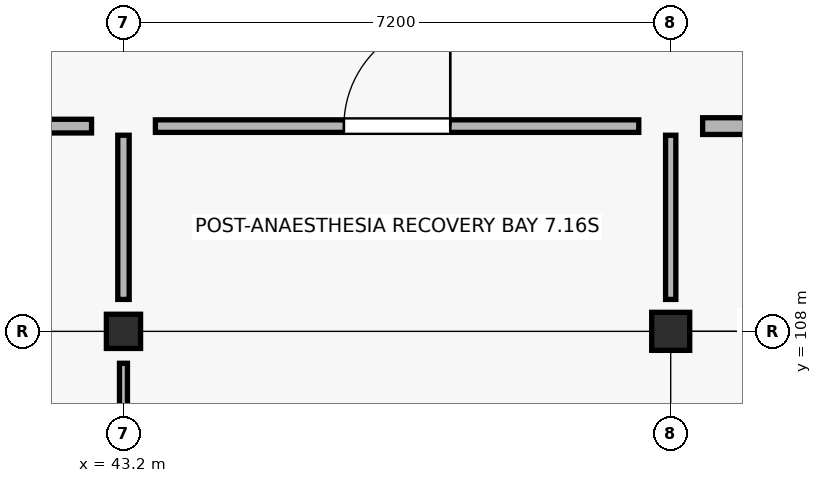
"""IFC4 building model, lengths in metres.
Left out: names, types, materials, properties, quantities, classifications, styles, units other than length and angle.
Written with IfcOpenShell. Run it as: python <this file> out.ifc"""

import sys

from ifc_helpers import new_model, si_unit, direction, frame, frame_2d, origin, origin_2d, place, context, subcontext, project, spatial, rectangle, extrude, element, fill, save


model = new_model("IFC4")
c1 = context("Model", 3, precision=1e-05, world=origin(), true_north=direction((0.0, 1.0)))
c2 = subcontext(c1, "Body", "Model", "MODEL_VIEW")
j1 = project(units=[si_unit("LENGTHUNIT", "METRE"), si_unit("PLANEANGLEUNIT", "RADIAN")], contexts=[c1])
p1 = place(None, origin())
s1 = spatial("IfcSite", under=j1, at=p1, CompositionType="ELEMENT")
p2 = place(p1, origin())
s2 = spatial("IfcBuilding", under=s1, at=p2, CompositionType="ELEMENT")
p3 = place(p2, frame((0.0, 0.0, 9.0)))
s3 = spatial("IfcBuildingStorey", under=s2, at=p3, CompositionType="ELEMENT", Elevation=9.0)
p4 = place(p3, frame((43.2, 108.0, 0.0), z_axis=(0.0, 0.0, 1.0), x_axis=(1.0, 0.0, 0.0)))
e1 = element("IfcColumn", 1, at=p4, inside=s3, PredefinedType="COLUMN", context=c2, shape_type="SweptSolid", body=[
    extrude(rectangle(XDim=0.45, YDim=0.45, at=origin_2d()), origin(), (0.0, 0.0, 1.0), 4.28),
])
p5 = place(p3, frame((50.4, 108.0, 0.0), z_axis=(0.0, 0.0, 1.0), x_axis=(1.0, 0.0, 0.0)))
e2 = element("IfcColumn", 2, at=p5, inside=s3, PredefinedType="COLUMN", context=c2, shape_type="SweptSolid", body=[
    extrude(rectangle(XDim=0.5, YDim=0.5, at=origin_2d()), origin(), (0.0, 0.0, 1.0), 4.28),
])
p6 = place(p3, frame((43.2, 105.54, 0.0), z_axis=(0.0, 0.0, 1.0), x_axis=(0.0, 1.0, 0.0)))
e3 = element("IfcWall", 3, at=p6, inside=s3, PredefinedType="PARTITIONING", context=c2, shape_type="SweptSolid", body=[
    extrude(rectangle(XDim=2.04, YDim=0.105, at=frame_2d((1.02, 0.0))), origin(), (0.0, 0.0, 1.0), 3.38),
])
p7 = place(p3, frame((36.42, 110.7, 0.0), z_axis=(0.0, 0.0, 1.0), x_axis=(1.0, 0.0, 0.0)))
e4 = element("IfcWall", 4, at=p7, inside=s3, PredefinedType="PARTITIONING", context=c2, shape_type="SweptSolid", body=[
    extrude(rectangle(XDim=6.36, YDim=0.18, at=frame_2d((3.18, 0.0))), origin(), (0.0, 0.0, 1.0), 3.38),
])
p8 = place(p7, frame((2.71, 0.0, 0.0)))
e5 = element("IfcOpeningElement", 5, at=p8, cuts=e4, PredefinedType="OPENING", context=c2, shape_type="SweptSolid", body=[
    extrude(rectangle(XDim=0.94, YDim=2.19, at=frame_2d((0.47, 1.095))), frame((0.0, 0.1, 0.0), z_axis=(0.0, -1.0, 0.0), x_axis=(1.0, 0.0, 0.0)), (0.0, 0.0, 1.0), 0.2),
])
p9 = place(p3, frame((43.2, 108.42, 0.0), z_axis=(0.0, 0.0, 1.0), x_axis=(0.0, 1.0, 0.0)))
e6 = element("IfcWall", 6, at=p9, inside=s3, PredefinedType="PARTITIONING", context=c2, shape_type="SweptSolid", body=[
    extrude(rectangle(XDim=2.16, YDim=0.15, at=frame_2d((1.08, 0.0))), origin(), (0.0, 0.0, 1.0), 3.38),
])
p10 = place(p3, frame((43.62, 110.7, 0.0), z_axis=(0.0, 0.0, 1.0), x_axis=(1.0, 0.0, 0.0)))
e7 = element("IfcWall", 7, at=p10, inside=s3, PredefinedType="PARTITIONING", context=c2, shape_type="SweptSolid", body=[
    extrude(rectangle(XDim=6.36, YDim=0.165, at=frame_2d((3.18, 0.0))), origin(), (0.0, 0.0, 1.0), 3.38),
])
p11 = place(p10, frame((2.48, 0.0, 0.0)))
e8 = element("IfcOpeningElement", 8, at=p11, cuts=e7, PredefinedType="OPENING", context=c2, shape_type="SweptSolid", body=[
    extrude(rectangle(XDim=1.4, YDim=2.2, at=frame_2d((0.7, 1.1))), frame((0.0, 0.093, 0.0), z_axis=(0.0, -1.0, 0.0), x_axis=(1.0, 0.0, 0.0)), (0.0, 0.0, 1.0), 0.185),
])
p12 = place(p3, frame((50.4, 108.42, 0.0), z_axis=(0.0, 0.0, 1.0), x_axis=(0.0, 1.0, 0.0)))
e9 = element("IfcWall", 9, at=p12, inside=s3, PredefinedType="PARTITIONING", context=c2, shape_type="SweptSolid", body=[
    extrude(rectangle(XDim=2.16, YDim=0.135, at=frame_2d((1.08, 0.0))), origin(), (0.0, 0.0, 1.0), 3.38),
])
p13 = place(p3, frame((50.82, 110.7, 0.0), z_axis=(0.0, 0.0, 1.0), x_axis=(1.0, 0.0, 0.0)))
e10 = element("IfcWall", 10, at=p13, inside=s3, PredefinedType="SOLIDWALL", context=c2, shape_type="SweptSolid", body=[
    extrude(rectangle(XDim=6.36, YDim=0.22, at=frame_2d((3.18, 0.0))), origin(), (0.0, 0.0, 1.0), 3.38),
])
p14 = place(p13, frame((2.43, 0.0, 0.0)))
e11 = element("IfcOpeningElement", 11, at=p14, cuts=e10, PredefinedType="OPENING", context=c2, shape_type="SweptSolid", body=[
    extrude(rectangle(XDim=1.5, YDim=2.2, at=frame_2d((0.75, 1.1))), frame((0.0, 0.12, 0.0), z_axis=(0.0, -1.0, 0.0), x_axis=(1.0, 0.0, 0.0)), (0.0, 0.0, 1.0), 0.24),
])
p15 = place(p11, origin())
e12 = element("IfcDoor", 12, at=p15, inside=s3, OperationType="SINGLE_SWING_RIGHT", PredefinedType="DOOR", context=c2, shape_type="SweptSolid", body=[
    extrude(rectangle(XDim=1.4, YDim=2.2, at=frame_2d((0.7, 1.1))), frame((0.0, 0.025, 0.0), z_axis=(0.0, -1.0, 0.0), x_axis=(1.0, 0.0, 0.0)), (0.0, 0.0, 1.0), 0.05),
])
fill(e8, e12)
save(model, sys.argv[1])
